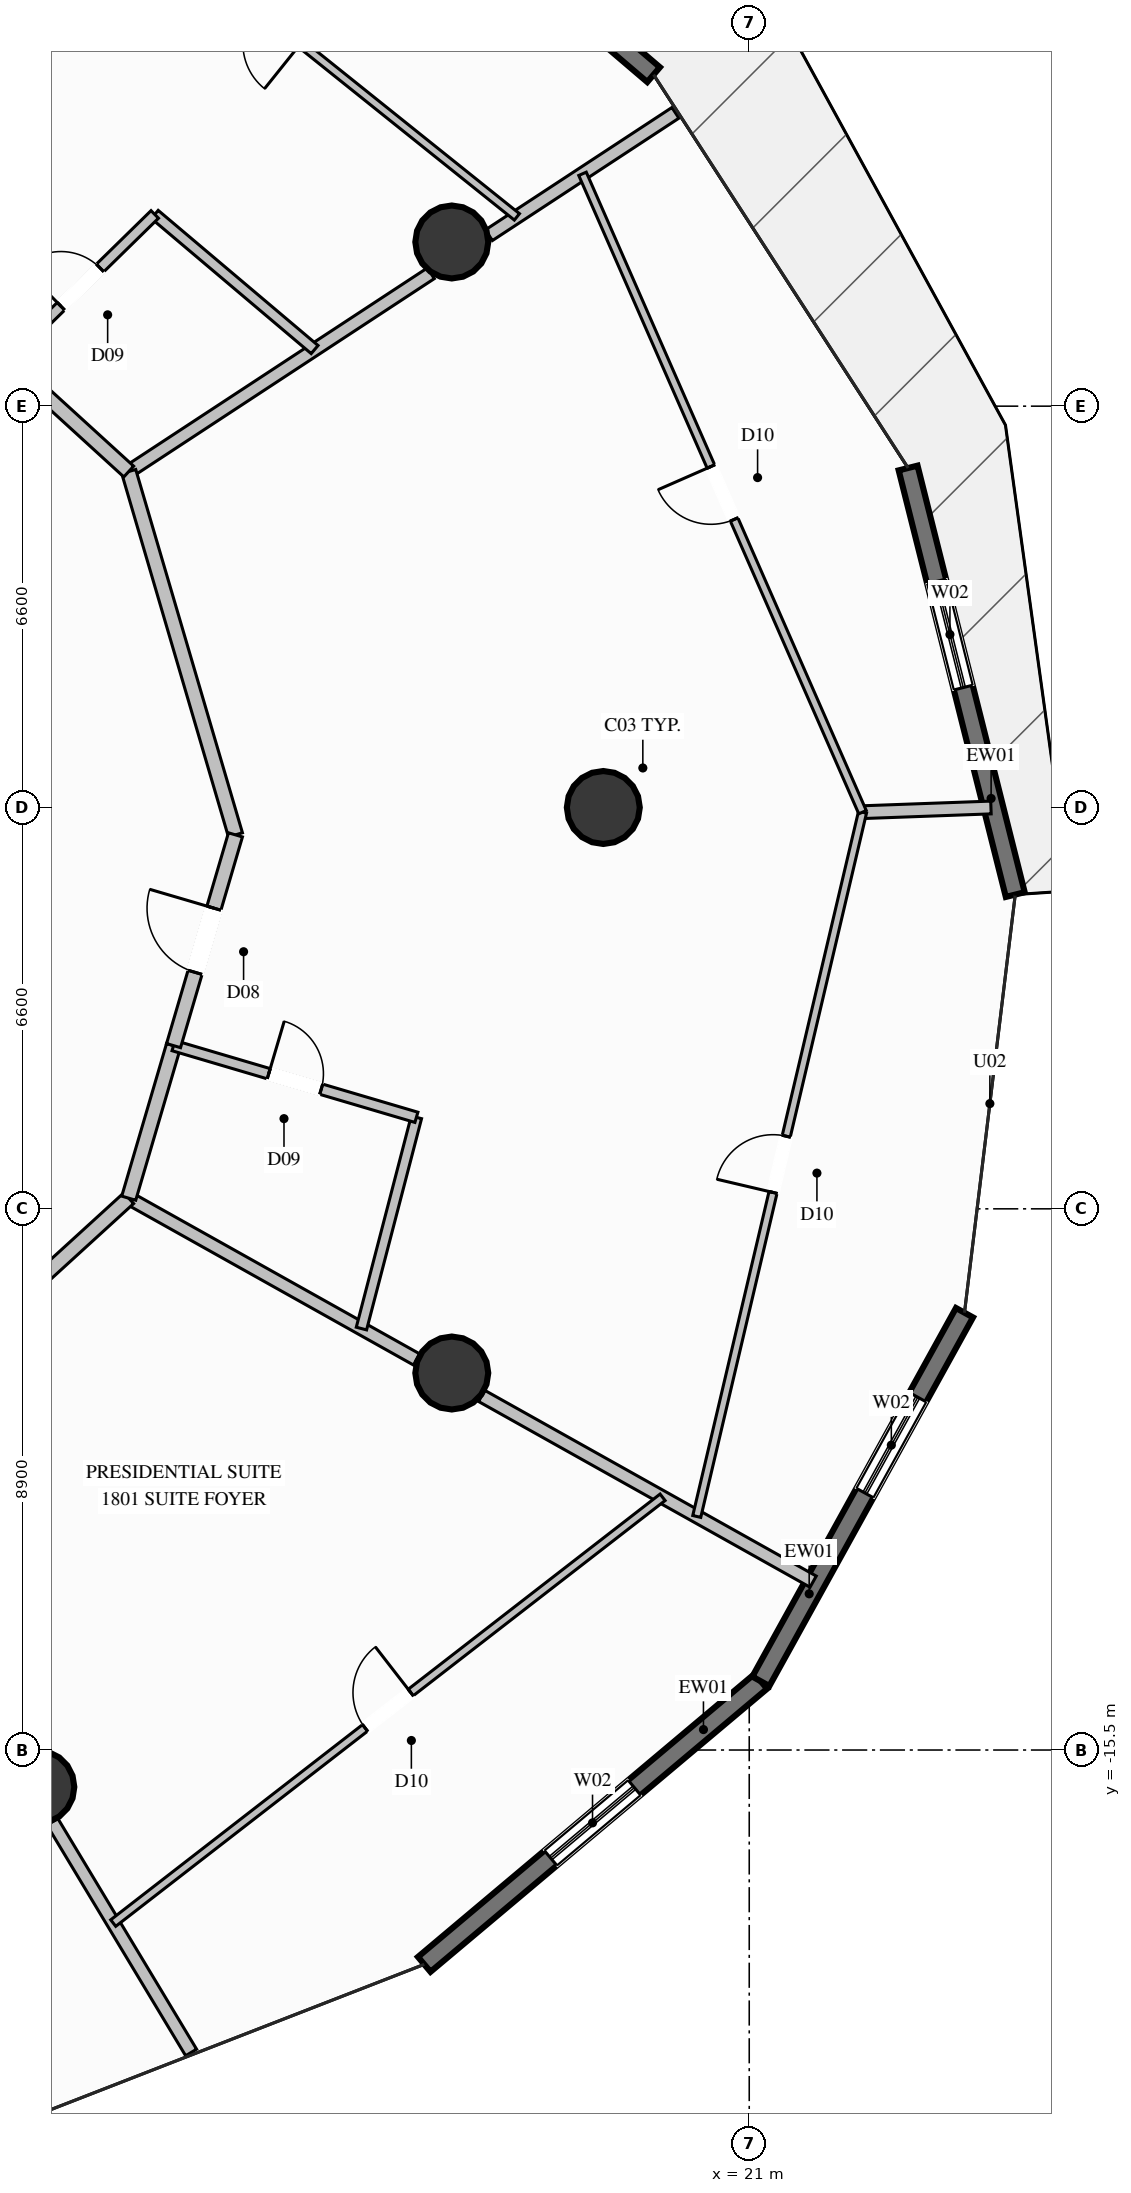
"""IFC4 building model, lengths in metres.
Left out: names, types, materials, properties, quantities, classifications, styles, units other than length and angle.
Written with IfcOpenShell. Run it as: python <this file> out.ifc"""

import sys

from ifc_helpers import new_model, si_unit, direction, frame, frame_2d, origin, origin_2d, place, context, subcontext, project, spatial, rectangle, circle, extrude, element, fill, save


model = new_model("IFC4")
c1 = context("Model", 3, precision=1e-05, world=origin(), true_north=direction((0.0, 1.0)))
c2 = subcontext(c1, "Body", "Model", "MODEL_VIEW")
j1 = project(units=[si_unit("LENGTHUNIT", "METRE"), si_unit("PLANEANGLEUNIT", "RADIAN")], contexts=[c1])
p1 = place(None, origin())
s1 = spatial("IfcSite", under=j1, at=p1, CompositionType="ELEMENT")
p2 = place(p1, origin())
s2 = spatial("IfcBuilding", under=s1, at=p2, CompositionType="ELEMENT")
p3 = place(p2, frame((0.0, 0.0, 68.0)))
s3 = spatial("IfcBuildingStorey", under=s2, at=p3, CompositionType="ELEMENT", Elevation=68.0)
for number, where, z_axis, x_axis in (
    (1, (18.6, 0.0, 0.0), (0.0, 0.0, 1.0), (1.0, 0.0, 0.0)),
    (2, (16.108, 9.3, 0.0), (0.0, 0.0, 1.0), (1.0, 0.0, 0.0)),
    (3, (9.3, -16.108, 0.0), (0.0, 0.0, 1.0), (1.0, 0.0, 0.0)),
    (4, (16.108, -9.3, 0.0), (0.0, 0.0, 1.0), (1.0, 0.0, 0.0)),
):
    element("IfcColumn", number, at=place(p3, frame(where, z_axis=z_axis, x_axis=x_axis)), inside=s3, PredefinedType="COLUMN", context=c2, shape_type="SweptSolid", body=[
        extrude(circle(Radius=0.6, at=origin_2d()), origin(), (0.0, 0.0, 1.0), 3.6),
    ])
p4 = place(p3, frame((23.613, 5.583, 0.0), z_axis=(0.0, 0.0, 1.0), x_axis=(0.243607685094, -0.969873855593, 0.0)))
e5 = element("IfcWall", 5, at=p4, inside=s3, PredefinedType="SOLIDWALL", context=c2, shape_type="SweptSolid", body=[
    extrude(rectangle(XDim=7.233, YDim=0.32, at=frame_2d((3.616, 0.0))), origin(), (0.0, 0.0, 1.0), 3.34),
])
p5 = place(p4, frame((1.923, 0.0, 0.35)))
e6 = element("IfcOpeningElement", 6, at=p5, cuts=e5, PredefinedType="OPENING", context=c2, shape_type="SweptSolid", body=[
    extrude(rectangle(XDim=1.8, YDim=2.6, at=frame_2d((0.9, 1.3))), frame((0.0, 0.17, 0.0), z_axis=(0.0, -1.0, 0.0), x_axis=(1.0, 0.0, 0.0)), (0.0, 0.0, 1.0), 0.34),
])
p6 = place(p3, frame((13.227, 17.341, 0.0), z_axis=(0.0, 0.0, 1.0), x_axis=(0.76078130933, -0.649008319958, 0.0)))
e7 = element("IfcWall", 7, at=p6, inside=s3, PredefinedType="SOLIDWALL", context=c2, shape_type="SweptSolid", body=[
    extrude(rectangle(XDim=8.149, YDim=0.32, at=frame_2d((4.075, 0.0))), origin(), (0.0, 0.0, 1.0), 3.34),
])
p7 = place(p6, frame((3.175, 0.0, 0.35)))
e8 = element("IfcOpeningElement", 8, at=p7, cuts=e7, PredefinedType="OPENING", context=c2, shape_type="SweptSolid", body=[
    extrude(rectangle(XDim=1.8, YDim=2.6, at=frame_2d((0.9, 1.3))), frame((0.0, 0.17, 0.0), z_axis=(0.0, -1.0, 0.0), x_axis=(1.0, 0.0, 0.0)), (0.0, 0.0, 1.0), 0.34),
])
p8 = place(p3, frame((21.191, -14.37, 0.0), z_axis=(0.0, 0.0, 1.0), x_axis=(-0.765388915414, -0.643568029164, 0.0)))
e9 = element("IfcWall", 9, at=p8, inside=s3, PredefinedType="SOLIDWALL", context=c2, shape_type="SweptSolid", body=[
    extrude(rectangle(XDim=7.233, YDim=0.32, at=frame_2d((3.616, 0.0))), origin(), (0.0, 0.0, 1.0), 3.34),
])
p9 = place(p8, frame((2.717, 0.0, 0.35)))
e10 = element("IfcOpeningElement", 10, at=p9, cuts=e9, PredefinedType="OPENING", context=c2, shape_type="SweptSolid", body=[
    extrude(rectangle(XDim=1.8, YDim=2.6, at=frame_2d((0.9, 1.3))), frame((0.0, 0.17, 0.0), z_axis=(0.0, -1.0, 0.0), x_axis=(1.0, 0.0, 0.0)), (0.0, 0.0, 1.0), 0.34),
])
p10 = place(p3, frame((24.54, -8.308, 0.0), z_axis=(0.0, 0.0, 1.0), x_axis=(-0.483582354317, -0.875298867013, 0.0)))
e11 = element("IfcWall", 11, at=p10, inside=s3, PredefinedType="SOLIDWALL", context=c2, shape_type="SweptSolid", body=[
    extrude(rectangle(XDim=6.926, YDim=0.32, at=frame_2d((3.463, 0.0))), origin(), (0.0, 0.0, 1.0), 3.34),
])
p11 = place(p10, frame((1.588, 0.0, 0.35)))
e12 = element("IfcOpeningElement", 12, at=p11, cuts=e11, PredefinedType="OPENING", context=c2, shape_type="SweptSolid", body=[
    extrude(rectangle(XDim=1.8, YDim=2.6, at=frame_2d((0.9, 1.3))), frame((0.0, 0.17, 0.0), z_axis=(0.0, -1.0, 0.0), x_axis=(1.0, 0.0, 0.0)), (0.0, 0.0, 1.0), 0.34),
])
p12 = place(p3, frame((10.795, 5.525, 0.0), z_axis=(0.0, 0.0, 1.0), x_axis=(0.836067345727, 0.548626825273, 0.0)))
e13 = element("IfcWall", 13, at=p12, inside=s3, PredefinedType="PARTITIONING", context=c2, shape_type="SweptSolid", body=[
    extrude(rectangle(XDim=5.942, YDim=0.21, at=frame_2d((2.971, 0.0))), origin(), (0.0, 0.0, 1.0), 2.709),
])
p13 = place(p3, frame((16.718, 9.411, 0.0), z_axis=(0.0, 0.0, 1.0), x_axis=(0.836061262726, 0.548636095212, 0.0)))
e14 = element("IfcWall", 14, at=p13, inside=s3, PredefinedType="PARTITIONING", context=c2, shape_type="SweptSolid", body=[
    extrude(rectangle(XDim=3.669, YDim=0.21, at=frame_2d((1.835, 0.0))), origin(), (0.0, 0.0, 1.0), 3.34),
])
p14 = place(p3, frame((9.539, -16.68, 0.0), z_axis=(0.0, 0.0, 1.0), x_axis=(0.515403672872, -0.856947521141, 0.0)))
e15 = element("IfcWall", 15, at=p14, inside=s3, PredefinedType="PARTITIONING", context=c2, shape_type="SweptSolid", body=[
    extrude(rectangle(XDim=4.427, YDim=0.21, at=frame_2d((2.214, 0.0))), origin(), (0.0, 0.0, 1.0), 3.34),
])
p15 = place(p3, frame((10.795, -6.425, 0.0), z_axis=(0.0, 0.0, 1.0), x_axis=(0.872447700458, -0.488707489164, 0.0)))
e16 = element("IfcWall", 16, at=p15, inside=s3, PredefinedType="PARTITIONING", context=c2, shape_type="SweptSolid", body=[
    extrude(rectangle(XDim=5.426, YDim=0.21, at=frame_2d((2.713, 0.0))), origin(), (0.0, 0.0, 1.0), 2.709),
])
p16 = place(p3, frame((16.6, -9.677, 0.0), z_axis=(0.0, 0.0, 1.0), x_axis=(0.872408051336, -0.48877826462, 0.0)))
e17 = element("IfcWall", 17, at=p16, inside=s3, PredefinedType="PARTITIONING", context=c2, shape_type="SweptSolid", body=[
    extrude(rectangle(XDim=6.248, YDim=0.21, at=frame_2d((3.124, 0.0))), origin(), (0.0, 0.0, 1.0), 3.34),
])
p17 = place(p3, frame((6.0, -10.799, 0.0), z_axis=(0.0, 0.0, 1.0), x_axis=(0.73878836807, 0.673937495028, 0.0)))
e18 = element("IfcWall", 18, at=p17, inside=s3, PredefinedType="PARTITIONING", context=c2, shape_type="SweptSolid", body=[
    extrude(rectangle(XDim=6.49, YDim=0.24, at=frame_2d((3.245, 0.0))), origin(), (0.0, 0.0, 1.0), 3.34),
])
p18 = place(p3, frame((10.54, -18.346, 0.0), z_axis=(0.0, 0.0, 1.0), x_axis=(0.790419447316, 0.612565994245, 0.0)))
e19 = element("IfcWall", 19, at=p18, inside=s3, PredefinedType="PARTITIONING", context=c2, shape_type="SweptSolid", body=[
    extrude(rectangle(XDim=11.43, YDim=0.135, at=frame_2d((5.715, 0.0))), origin(), (0.0, 0.0, 1.0), 3.34),
])
p19 = place(p18, frame((5.24, 0.0, 0.0)))
e20 = element("IfcOpeningElement", 20, at=p19, cuts=e19, PredefinedType="OPENING", context=c2, shape_type="SweptSolid", body=[
    extrude(rectangle(XDim=0.95, YDim=2.1, at=frame_2d((0.475, 1.05))), frame((0.0, 0.078, 0.0), z_axis=(0.0, -1.0, 0.0), x_axis=(1.0, 0.0, 0.0)), (0.0, 0.0, 1.0), 0.155),
])
p20 = place(p3, frame((10.795, -6.425, 0.0), z_axis=(0.0, 0.0, 1.0), x_axis=(0.281852929568, 0.959457620791, 0.0)))
e21 = element("IfcWall", 21, at=p20, inside=s3, PredefinedType="PARTITIONING", context=c2, shape_type="SweptSolid", body=[
    extrude(rectangle(XDim=2.615, YDim=0.24, at=frame_2d((1.308, 0.0))), origin(), (0.0, 0.0, 1.0), 3.34),
])
p21 = place(p3, frame((14.622, -8.569, 0.0), z_axis=(0.0, 0.0, 1.0), x_axis=(0.251773997666, 0.967786058021, 0.0)))
e22 = element("IfcWall", 22, at=p21, inside=s3, PredefinedType="PLUMBINGWALL", context=c2, shape_type="SweptSolid", body=[
    extrude(rectangle(XDim=3.59, YDim=0.175, at=frame_2d((1.795, 0.0))), origin(), (0.0, 0.0, 1.0), 3.34),
])
p22 = place(p3, frame((11.532, -3.916, 0.0), z_axis=(0.0, 0.0, 1.0), x_axis=(0.959086834847, -0.28311206831, 0.0)))
e23 = element("IfcWall", 23, at=p22, inside=s3, PredefinedType="PLUMBINGWALL", context=c2, shape_type="SweptSolid", body=[
    extrude(rectangle(XDim=4.164, YDim=0.175, at=frame_2d((2.082, 0.0))), origin(), (0.0, 0.0, 1.0), 3.34),
])
p23 = place(p22, frame((1.632, 0.0, 0.0)))
e24 = element("IfcOpeningElement", 24, at=p23, cuts=e23, PredefinedType="OPENING", context=c2, shape_type="SweptSolid", body=[
    extrude(rectangle(XDim=0.9, YDim=2.1, at=frame_2d((0.45, 1.05))), frame((0.0, 0.098, 0.0), z_axis=(0.0, -1.0, 0.0), x_axis=(1.0, 0.0, 0.0)), (0.0, 0.0, 1.0), 0.195),
])
p24 = place(p3, frame((22.863, -0.077, 0.0), z_axis=(0.0, 0.0, 1.0), x_axis=(0.999337742479, 0.03638786139, 0.0)))
e25 = element("IfcWall", 25, at=p24, inside=s3, PredefinedType="PARTITIONING", context=c2, shape_type="SweptSolid", body=[
    extrude(rectangle(XDim=2.114, YDim=0.21, at=frame_2d((1.057, 0.0))), origin(), (0.0, 0.0, 1.0), 3.34),
])
p25 = place(p3, frame((12.55, -0.45, 0.0), z_axis=(0.0, 0.0, 1.0), x_axis=(-0.281843679574, 0.959460338046, 0.0)))
e26 = element("IfcWall", 26, at=p25, inside=s3, PredefinedType="PARTITIONING", context=c2, shape_type="SweptSolid", body=[
    extrude(rectangle(XDim=6.227, YDim=0.24, at=frame_2d((3.114, 0.0))), origin(), (0.0, 0.0, 1.0), 3.34),
])
p26 = place(p3, frame((11.532, -3.916, 0.0), z_axis=(0.0, 0.0, 1.0), x_axis=(0.281818707972, 0.959467673159, 0.0)))
e27 = element("IfcWall", 27, at=p26, inside=s3, PredefinedType="PARTITIONING", context=c2, shape_type="SweptSolid", body=[
    extrude(rectangle(XDim=3.613, YDim=0.24, at=frame_2d((1.806, 0.0))), origin(), (0.0, 0.0, 1.0), 3.34),
])
p27 = place(p26, frame((1.256, 0.0, 0.0)))
e28 = element("IfcOpeningElement", 28, at=p27, cuts=e27, PredefinedType="OPENING", context=c2, shape_type="SweptSolid", body=[
    extrude(rectangle(XDim=1.1, YDim=2.3, at=frame_2d((0.55, 1.15))), frame((0.0, 0.13, 0.0), z_axis=(0.0, -1.0, 0.0), x_axis=(1.0, 0.0, 0.0)), (0.0, 0.0, 1.0), 0.26),
])
p28 = place(p3, frame((20.137, -11.659, 0.0), z_axis=(0.0, 0.0, 1.0), x_axis=(0.229110239879, 0.973400481807, 0.0)))
e29 = element("IfcWall", 29, at=p28, inside=s3, PredefinedType="PARTITIONING", context=c2, shape_type="SweptSolid", body=[
    extrude(rectangle(XDim=11.898, YDim=0.135, at=frame_2d((5.949, 0.0))), origin(), (0.0, 0.0, 1.0), 3.34),
])
p29 = place(p28, frame((5.474, 0.0, 0.0)))
e30 = element("IfcOpeningElement", 30, at=p29, cuts=e29, PredefinedType="OPENING", context=c2, shape_type="SweptSolid", body=[
    extrude(rectangle(XDim=0.95, YDim=2.1, at=frame_2d((0.475, 1.05))), frame((0.0, 0.078, 0.0), z_axis=(0.0, -1.0, 0.0), x_axis=(1.0, 0.0, 0.0)), (0.0, 0.0, 1.0), 0.155),
])
p30 = place(p3, frame((22.863, -0.077, 0.0), z_axis=(0.0, 0.0, 1.0), x_axis=(-0.401711318502, 0.915766354802, 0.0)))
e31 = element("IfcWall", 31, at=p30, inside=s3, PredefinedType="PARTITIONING", context=c2, shape_type="SweptSolid", body=[
    extrude(rectangle(XDim=11.463, YDim=0.135, at=frame_2d((5.732, 0.0))), origin(), (0.0, 0.0, 1.0), 3.34),
])
p31 = place(p30, frame((5.257, 0.0, 0.0)))
e32 = element("IfcOpeningElement", 32, at=p31, cuts=e31, PredefinedType="OPENING", context=c2, shape_type="SweptSolid", body=[
    extrude(rectangle(XDim=0.95, YDim=2.1, at=frame_2d((0.475, 1.05))), frame((0.0, 0.078, 0.0), z_axis=(0.0, -1.0, 0.0), x_axis=(1.0, 0.0, 0.0)), (0.0, 0.0, 1.0), 0.155),
])
p32 = place(p3, frame((10.795, 5.525, 0.0), z_axis=(0.0, 0.0, 1.0), x_axis=(-0.738784017848, 0.673942263827, 0.0)))
e33 = element("IfcWall", 33, at=p32, inside=s3, PredefinedType="PARTITIONING", context=c2, shape_type="SweptSolid", body=[
    extrude(rectangle(XDim=2.726, YDim=0.24, at=frame_2d((1.363, 0.0))), origin(), (0.0, 0.0, 1.0), 3.34),
])
p33 = place(p3, frame((13.852, 7.531, 0.0), z_axis=(0.0, 0.0, 1.0), x_axis=(-0.76377891562, 0.645477937697, 0.0)))
e34 = element("IfcWall", 34, at=p33, inside=s3, PredefinedType="PLUMBINGWALL", context=c2, shape_type="SweptSolid", body=[
    extrude(rectangle(XDim=3.442, YDim=0.175, at=frame_2d((1.721, 0.0))), origin(), (0.0, 0.0, 1.0), 3.34),
])
p34 = place(p3, frame((8.781, 7.362, 0.0), z_axis=(0.0, 0.0, 1.0), x_axis=(0.714532745867, 0.699601997628, 0.0)))
e35 = element("IfcWall", 35, at=p34, inside=s3, PredefinedType="PLUMBINGWALL", context=c2, shape_type="SweptSolid", body=[
    extrude(rectangle(XDim=3.417, YDim=0.175, at=frame_2d((1.709, 0.0))), origin(), (0.0, 0.0, 1.0), 2.709),
])
p35 = place(p34, frame((1.259, 0.0, 0.0)))
e36 = element("IfcOpeningElement", 36, at=p35, cuts=e35, PredefinedType="OPENING", context=c2, shape_type="SweptSolid", body=[
    extrude(rectangle(XDim=0.9, YDim=2.1, at=frame_2d((0.45, 1.05))), frame((0.0, 0.098, 0.0), z_axis=(0.0, -1.0, 0.0), x_axis=(1.0, 0.0, 0.0)), (0.0, 0.0, 1.0), 0.195),
])
p36 = place(p3, frame((17.179, 9.713, 0.0), z_axis=(0.0, 0.0, 1.0), x_axis=(-0.780480528916, 0.625180089241, 0.0)))
e37 = element("IfcWall", 37, at=p36, inside=s3, PredefinedType="PARTITIONING", context=c2, shape_type="SweptSolid", body=[
    extrude(rectangle(XDim=10.064, YDim=0.135, at=frame_2d((5.032, 0.0))), origin(), (0.0, 0.0, 1.0), 2.793),
])
p37 = place(p36, frame((4.557, 0.0, 0.0)))
e38 = element("IfcOpeningElement", 38, at=p37, cuts=e37, PredefinedType="OPENING", context=c2, shape_type="SweptSolid", body=[
    extrude(rectangle(XDim=0.95, YDim=2.1, at=frame_2d((0.475, 1.05))), frame((0.0, 0.078, 0.0), z_axis=(0.0, -1.0, 0.0), x_axis=(1.0, 0.0, 0.0)), (0.0, 0.0, 1.0), 0.155),
])
p38 = place(p5, origin())
e39 = element("IfcWindow", 39, at=p38, inside=s3, PartitioningType="SINGLE_PANEL", PredefinedType="WINDOW", context=c2, shape_type="SweptSolid", body=[
    extrude(rectangle(XDim=1.8, YDim=2.6, at=frame_2d((0.9, 1.3))), frame((0.0, 0.03, 0.0), z_axis=(0.0, -1.0, 0.0), x_axis=(1.0, 0.0, 0.0)), (0.0, 0.0, 1.0), 0.06),
])
fill(e6, e39)
p39 = place(p9, origin())
e40 = element("IfcWindow", 40, at=p39, inside=s3, PartitioningType="SINGLE_PANEL", PredefinedType="WINDOW", context=c2, shape_type="SweptSolid", body=[
    extrude(rectangle(XDim=1.8, YDim=2.6, at=frame_2d((0.9, 1.3))), frame((0.0, 0.03, 0.0), z_axis=(0.0, -1.0, 0.0), x_axis=(1.0, 0.0, 0.0)), (0.0, 0.0, 1.0), 0.06),
])
fill(e10, e40)
p40 = place(p11, origin())
e41 = element("IfcWindow", 41, at=p40, inside=s3, PartitioningType="SINGLE_PANEL", PredefinedType="WINDOW", context=c2, shape_type="SweptSolid", body=[
    extrude(rectangle(XDim=1.8, YDim=2.6, at=frame_2d((0.9, 1.3))), frame((0.0, 0.03, 0.0), z_axis=(0.0, -1.0, 0.0), x_axis=(1.0, 0.0, 0.0)), (0.0, 0.0, 1.0), 0.06),
])
fill(e12, e41)
p41 = place(p19, origin())
e42 = element("IfcDoor", 42, at=p41, inside=s3, OperationType="SINGLE_SWING_RIGHT", PredefinedType="DOOR", context=c2, shape_type="SweptSolid", body=[
    extrude(rectangle(XDim=0.95, YDim=2.1, at=frame_2d((0.475, 1.05))), frame((0.0, 0.025, 0.0), z_axis=(0.0, -1.0, 0.0), x_axis=(1.0, 0.0, 0.0)), (0.0, 0.0, 1.0), 0.05),
])
fill(e20, e42)
p42 = place(p23, origin())
e43 = element("IfcDoor", 43, at=p42, inside=s3, OperationType="SINGLE_SWING_LEFT", PredefinedType="DOOR", context=c2, shape_type="SweptSolid", body=[
    extrude(rectangle(XDim=0.9, YDim=2.1, at=frame_2d((0.45, 1.05))), frame((0.0, 0.025, 0.0), z_axis=(0.0, -1.0, 0.0), x_axis=(1.0, 0.0, 0.0)), (0.0, 0.0, 1.0), 0.05),
])
fill(e24, e43)
p43 = place(p27, origin())
e44 = element("IfcDoor", 44, at=p43, inside=s3, OperationType="SINGLE_SWING_RIGHT", PredefinedType="DOOR", context=c2, shape_type="SweptSolid", body=[
    extrude(rectangle(XDim=1.1, YDim=2.3, at=frame_2d((0.55, 1.15))), frame((0.0, 0.025, 0.0), z_axis=(0.0, -1.0, 0.0), x_axis=(1.0, 0.0, 0.0)), (0.0, 0.0, 1.0), 0.05),
])
fill(e28, e44)
p44 = place(p29, origin())
e45 = element("IfcDoor", 45, at=p44, inside=s3, OperationType="SINGLE_SWING_LEFT", PredefinedType="DOOR", context=c2, shape_type="SweptSolid", body=[
    extrude(rectangle(XDim=0.95, YDim=2.1, at=frame_2d((0.475, 1.05))), frame((0.0, 0.025, 0.0), z_axis=(0.0, -1.0, 0.0), x_axis=(1.0, 0.0, 0.0)), (0.0, 0.0, 1.0), 0.05),
])
fill(e30, e45)
p45 = place(p31, origin())
e46 = element("IfcDoor", 46, at=p45, inside=s3, OperationType="SINGLE_SWING_RIGHT", PredefinedType="DOOR", context=c2, shape_type="SweptSolid", body=[
    extrude(rectangle(XDim=0.95, YDim=2.1, at=frame_2d((0.475, 1.05))), frame((0.0, 0.025, 0.0), z_axis=(0.0, -1.0, 0.0), x_axis=(1.0, 0.0, 0.0)), (0.0, 0.0, 1.0), 0.05),
])
fill(e32, e46)
p46 = place(p35, origin())
e47 = element("IfcDoor", 47, at=p46, inside=s3, OperationType="SINGLE_SWING_LEFT", PredefinedType="DOOR", context=c2, shape_type="SweptSolid", body=[
    extrude(rectangle(XDim=0.9, YDim=2.1, at=frame_2d((0.45, 1.05))), frame((0.0, 0.025, 0.0), z_axis=(0.0, -1.0, 0.0), x_axis=(1.0, 0.0, 0.0)), (0.0, 0.0, 1.0), 0.05),
])
fill(e36, e47)
save(model, sys.argv[1])
